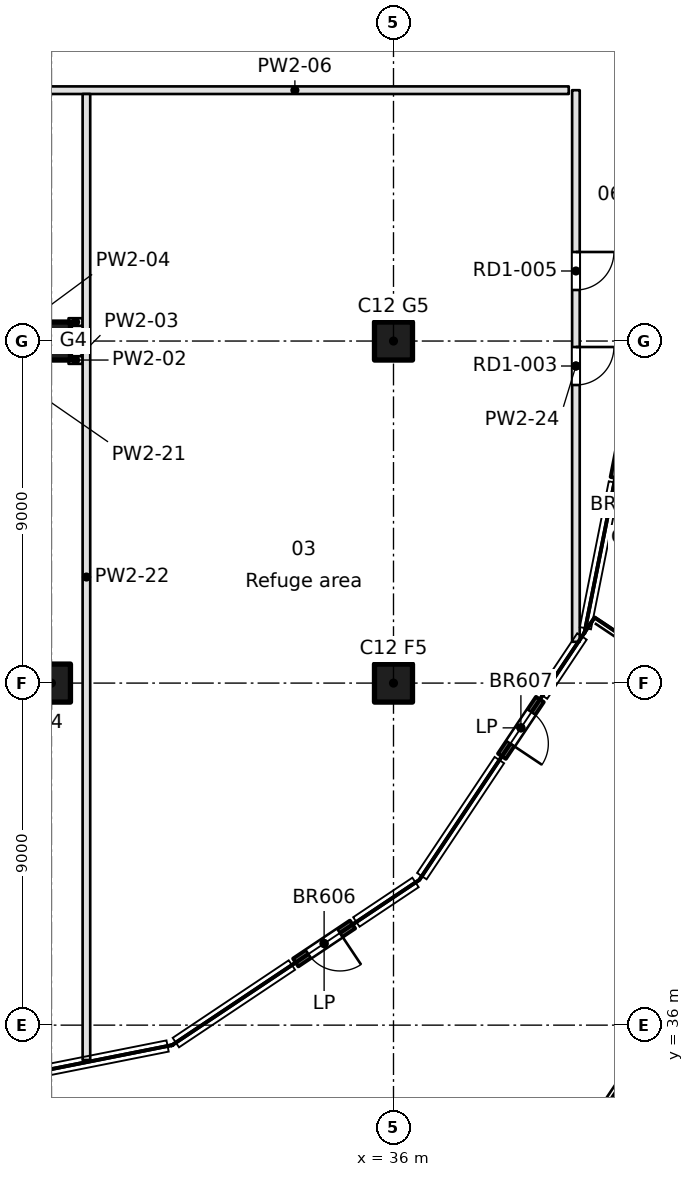
"""IFC4 building model, lengths in metres.
Left out: names, types, materials, properties, quantities, classifications, styles, units other than length and angle.
Written with IfcOpenShell. Run it as: python <this file> out.ifc"""

import sys

from ifc_helpers import new_model, si_unit, direction, frame, frame_2d, origin, origin_2d, place, context, subcontext, project, spatial, rectangle, extrude, element, fill, save


model = new_model("IFC4")
c1 = context("Model", 3, precision=1e-05, world=origin(), true_north=direction((0.0, 1.0)))
c2 = subcontext(c1, "Body", "Model", "MODEL_VIEW")
j1 = project(units=[si_unit("LENGTHUNIT", "METRE"), si_unit("PLANEANGLEUNIT", "RADIAN")], contexts=[c1])
p1 = place(None, origin())
s1 = spatial("IfcSite", under=j1, at=p1, CompositionType="ELEMENT")
p2 = place(p1, origin())
s2 = spatial("IfcBuilding", under=s1, at=p2, CompositionType="ELEMENT")
p3 = place(p2, frame((0.0, 0.0, 276.2)))
s3 = spatial("IfcBuildingStorey", under=s2, at=p3, CompositionType="ELEMENT", Elevation=276.2)
for number, where, z_axis, x_axis in (
    (1, (27.0, 45.0, 0.0), (0.0, 0.0, 1.0), (1.0, 0.0, 0.0)),
    (2, (27.0, 54.0, 0.0), (0.0, 0.0, 1.0), (1.0, 0.0, 0.0)),
    (3, (36.0, 45.0, 0.0), (0.0, 0.0, 1.0), (1.0, 0.0, 0.0)),
    (4, (36.0, 54.0, 0.0), (0.0, 0.0, 1.0), (1.0, 0.0, 0.0)),
):
    element("IfcColumn", number, at=place(p3, frame(where, z_axis=z_axis, x_axis=x_axis)), inside=s3, PredefinedType="COLUMN", context=c2, shape_type="SweptSolid", body=[
        extrude(rectangle(XDim=1.0, YDim=1.0, at=origin_2d()), origin(), (0.0, 0.0, 1.0), 4.6),
    ])
p4 = place(p3, frame((33.426, 37.648, 0.0), z_axis=(0.0, 0.0, 1.0), x_axis=(0.83146554274, 0.555576323502, 0.0)))
e5 = element("IfcWall", 5, at=p4, inside=s3, PredefinedType="SOLIDWALL", context=c2, shape_type="SweptSolid", body=[
    extrude(rectangle(XDim=1.8, YDim=0.25, at=frame_2d((0.9, 0.0))), origin(), (0.0, 0.0, 1.0), 4.2),
])
p5 = place(p4, frame((0.4, 0.0, 0.0)))
e6 = element("IfcOpeningElement", 6, at=p5, cuts=e5, PredefinedType="OPENING", context=c2, shape_type="SweptSolid", body=[
    extrude(rectangle(XDim=1.0, YDim=2.1, at=frame_2d((0.5, 1.05))), frame((0.0, 0.125, 0.0), z_axis=(0.0, -1.0, 0.0), x_axis=(1.0, 0.0, 0.0)), (0.0, 0.0, 1.0), 0.25),
])
p6 = place(p3, frame((38.852, 43.074, 0.0), z_axis=(0.0, 0.0, 1.0), x_axis=(0.555576323502, 0.83146554274, 0.0)))
e7 = element("IfcWall", 7, at=p6, inside=s3, PredefinedType="SOLIDWALL", context=c2, shape_type="SweptSolid", body=[
    extrude(rectangle(XDim=1.8, YDim=0.25, at=frame_2d((0.9, 0.0))), origin(), (0.0, 0.0, 1.0), 4.2),
])
p7 = place(p6, frame((0.4, 0.0, 0.0)))
e8 = element("IfcOpeningElement", 8, at=p7, cuts=e7, PredefinedType="OPENING", context=c2, shape_type="SweptSolid", body=[
    extrude(rectangle(XDim=1.0, YDim=2.1, at=frame_2d((0.5, 1.05))), frame((0.0, 0.125, 0.0), z_axis=(0.0, -1.0, 0.0), x_axis=(1.0, 0.0, 0.0)), (0.0, 0.0, 1.0), 0.25),
])
p8 = place(p3, frame((41.835, 50.398, 0.0), z_axis=(0.0, 0.0, 1.0), x_axis=(0.19517704197, 0.980768026746, 0.0)))
e9 = element("IfcWall", 9, at=p8, inside=s3, PredefinedType="SOLIDWALL", context=c2, shape_type="SweptSolid", body=[
    extrude(rectangle(XDim=1.8, YDim=0.25, at=frame_2d((0.9, 0.0))), origin(), (0.0, 0.0, 1.0), 4.2),
])
p9 = place(p8, frame((0.4, 0.0, 0.0)))
e10 = element("IfcOpeningElement", 10, at=p9, cuts=e9, PredefinedType="OPENING", context=c2, shape_type="SweptSolid", body=[
    extrude(rectangle(XDim=1.0, YDim=2.1, at=frame_2d((0.5, 1.05))), frame((0.0, 0.125, 0.0), z_axis=(0.0, -1.0, 0.0), x_axis=(1.0, 0.0, 0.0)), (0.0, 0.0, 1.0), 0.25),
])
for number, where, z_axis, x_axis in (
    (11, (27.45, 53.5, 0.0), (0.0, 0.0, 1.0), (1.0, 0.0, 0.0)),
    (12, (27.45, 54.5, 0.0), (0.0, 0.0, 1.0), (1.0, 0.0, 0.0)),
):
    element("IfcWall", number, at=place(p3, frame(where, z_axis=z_axis, x_axis=x_axis)), inside=s3, PredefinedType="PARTITIONING", context=c2, shape_type="SweptSolid", body=[
        extrude(rectangle(XDim=0.37, YDim=0.2, at=frame_2d((0.185, 0.0))), origin(), (0.0, 0.0, 1.0), 4.2),
    ])
p10 = place(p3, frame((40.611, 60.6, 0.0), z_axis=(0.0, 0.0, 1.0), x_axis=(-1.0, 0.0, 0.0)))
e13 = element("IfcWall", 13, at=p10, inside=s3, PredefinedType="PARTITIONING", context=c2, shape_type="SweptSolid", body=[
    extrude(rectangle(XDim=14.411, YDim=0.2, at=frame_2d((7.206, 0.0))), origin(), (0.0, 0.0, 1.0), 4.2),
])
p11 = place(p3, frame((27.92, 60.5, 0.0), z_axis=(0.0, 0.0, 1.0), x_axis=(0.0, -1.0, 0.0)))
e14 = element("IfcWall", 14, at=p11, inside=s3, PredefinedType="PARTITIONING", context=c2, shape_type="SweptSolid", body=[
    extrude(rectangle(XDim=25.419, YDim=0.2, at=frame_2d((12.709, 0.0))), origin(), (0.0, 0.0, 1.0), 4.2),
])
p12 = place(p3, frame((40.8, 46.086, 0.0), z_axis=(0.0, 0.0, 1.0), x_axis=(0.0, 1.0, 0.0)))
e15 = element("IfcWall", 15, at=p12, inside=s3, PredefinedType="PARTITIONING", context=c2, shape_type="SweptSolid", body=[
    extrude(rectangle(XDim=14.514, YDim=0.2, at=frame_2d((7.257, 0.0))), origin(), (0.0, 0.0, 1.0), 4.2),
])
p13 = place(p12, frame((6.757, 0.0, 0.0)))
e16 = element("IfcOpeningElement", 16, at=p13, cuts=e15, PredefinedType="OPENING", context=c2, shape_type="SweptSolid", body=[
    extrude(rectangle(XDim=1.0, YDim=2.1, at=frame_2d((0.5, 1.05))), frame((0.0, 0.1, 0.0), z_axis=(0.0, -1.0, 0.0), x_axis=(1.0, 0.0, 0.0)), (0.0, 0.0, 1.0), 0.2),
])
p14 = place(p12, frame((9.257, 0.0, 0.0)))
e17 = element("IfcOpeningElement", 17, at=p14, cuts=e15, PredefinedType="OPENING", context=c2, shape_type="SweptSolid", body=[
    extrude(rectangle(XDim=1.0, YDim=2.1, at=frame_2d((0.5, 1.05))), frame((0.0, 0.1, 0.0), z_axis=(0.0, -1.0, 0.0), x_axis=(1.0, 0.0, 0.0)), (0.0, 0.0, 1.0), 0.2),
])
p15 = place(p5, frame((1.0, 0.0, 0.0), z_axis=(0.0, 0.0, 1.0), x_axis=(-1.0, 0.0, 0.0)))
e18 = element("IfcDoor", 18, at=p15, inside=s3, OperationType="SINGLE_SWING_LEFT", PredefinedType="DOOR", context=c2, shape_type="SweptSolid", body=[
    extrude(rectangle(XDim=1.0, YDim=2.1, at=frame_2d((0.5, 1.05))), frame((0.0, 0.025, 0.0), z_axis=(0.0, -1.0, 0.0), x_axis=(1.0, 0.0, 0.0)), (0.0, 0.0, 1.0), 0.05),
])
fill(e6, e18)
p16 = place(p7, frame((1.0, 0.0, 0.0), z_axis=(0.0, 0.0, 1.0), x_axis=(-1.0, 0.0, 0.0)))
e19 = element("IfcDoor", 19, at=p16, inside=s3, OperationType="SINGLE_SWING_RIGHT", PredefinedType="DOOR", context=c2, shape_type="SweptSolid", body=[
    extrude(rectangle(XDim=1.0, YDim=2.1, at=frame_2d((0.5, 1.05))), frame((0.0, 0.025, 0.0), z_axis=(0.0, -1.0, 0.0), x_axis=(1.0, 0.0, 0.0)), (0.0, 0.0, 1.0), 0.05),
])
fill(e8, e19)
p17 = place(p13, frame((1.0, 0.0, 0.0), z_axis=(0.0, 0.0, 1.0), x_axis=(-1.0, 0.0, 0.0)))
e20 = element("IfcDoor", 20, at=p17, inside=s3, OperationType="SINGLE_SWING_LEFT", PredefinedType="DOOR", context=c2, shape_type="SweptSolid", body=[
    extrude(rectangle(XDim=1.0, YDim=2.1, at=frame_2d((0.5, 1.05))), frame((0.0, 0.025, 0.0), z_axis=(0.0, -1.0, 0.0), x_axis=(1.0, 0.0, 0.0)), (0.0, 0.0, 1.0), 0.05),
])
fill(e16, e20)
p18 = place(p14, frame((1.0, 0.0, 0.0), z_axis=(0.0, 0.0, 1.0), x_axis=(-1.0, 0.0, 0.0)))
e21 = element("IfcDoor", 21, at=p18, inside=s3, OperationType="SINGLE_SWING_LEFT", PredefinedType="DOOR", context=c2, shape_type="SweptSolid", body=[
    extrude(rectangle(XDim=1.0, YDim=2.1, at=frame_2d((0.5, 1.05))), frame((0.0, 0.025, 0.0), z_axis=(0.0, -1.0, 0.0), x_axis=(1.0, 0.0, 0.0)), (0.0, 0.0, 1.0), 0.05),
])
fill(e17, e21)
save(model, sys.argv[1])
